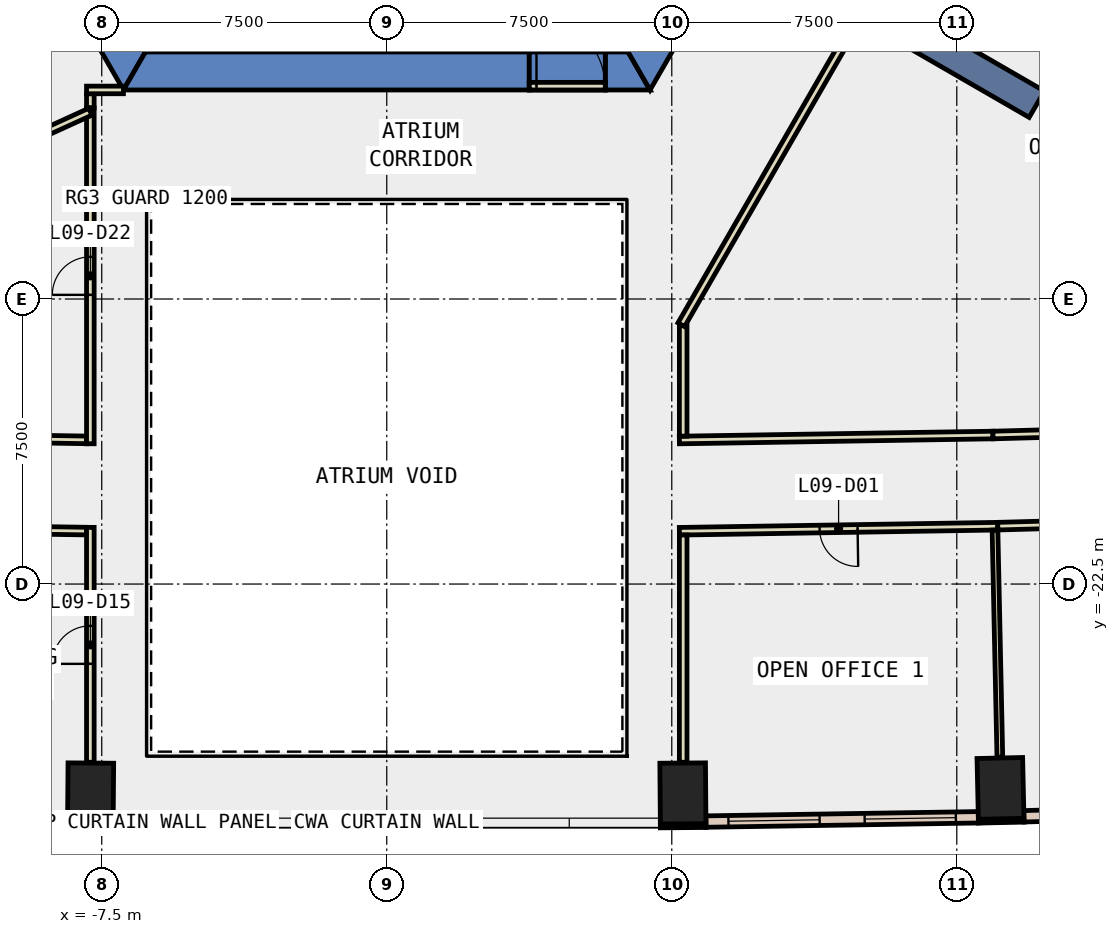
"""IFC4 building model, lengths in metres.
Left out: names, types, materials, properties, quantities, classifications, styles, units other than length and angle.
Written with IfcOpenShell. Run it as: python <this file> out.ifc"""

import sys

from ifc_helpers import new_model, si_unit, direction, frame, frame_2d, origin, origin_2d, place, context, subcontext, project, spatial, polyline, rectangle, outline, extrude, element, fill, save


model = new_model("IFC4")
c1 = context("Model", 3, precision=1e-05, world=origin(), true_north=direction((0.0, 1.0)))
c2 = subcontext(c1, "Body", "Model", "MODEL_VIEW")
j1 = project(units=[si_unit("LENGTHUNIT", "METRE"), si_unit("PLANEANGLEUNIT", "RADIAN")], contexts=[c1])
p1 = place(None, origin())
s1 = spatial("IfcSite", under=j1, at=p1, CompositionType="ELEMENT")
p2 = place(p1, origin())
s2 = spatial("IfcBuilding", under=s1, at=p2, CompositionType="ELEMENT")
p3 = place(p2, frame((0.0, 0.0, 47.6)))
s3 = spatial("IfcBuildingStorey", under=s2, at=p3, CompositionType="ELEMENT", Elevation=47.6)
for number, where, z_axis, x_axis in (
    (1, (-7.793, -28.01, -0.4), (0.0, 0.0, 1.0), (-1.0, 0.008, 0.0)),
    (2, (7.793, -28.01, -0.4), (0.0, 0.0, 1.0), (1.0, 0.008, 0.0)),
    (3, (16.15, -27.877, -0.4), (0.0, 0.0, 1.0), (1.0, 0.022, 0.0)),
):
    element("IfcColumn", number, at=place(p3, frame(where, z_axis=z_axis, x_axis=x_axis)), inside=s3, PredefinedType="COLUMN", context=c2, shape_type="SweptSolid", body=[
        extrude(rectangle(XDim=1.2, YDim=1.6, at=origin_2d()), origin(), (0.0, 0.0, 1.0), 4.2),
    ])
p4 = place(p3, frame((0.0, 0.0, -0.4)))
e4 = element("IfcWall", 4, at=p4, inside=s3, PredefinedType="SHEAR", context=c2, shape_type="SweptSolid", body=[
    extrude(outline(polyline([(-13.856, 2.5), (-6.928, -9.5), (-6.351, -8.5), (-12.702, 2.5), (-13.856, 2.5)])), origin(), (0.0, 0.0, 1.0), 4.2),
])
p5 = place(p3, frame((0.0, 0.0, -0.4)))
e5 = element("IfcWall", 5, at=p5, inside=s3, PredefinedType="SHEAR", context=c2, shape_type="SweptSolid", body=[
    extrude(outline(polyline([(3.75, -9.5), (3.75, -8.5), (-6.351, -8.5), (-6.928, -9.5), (3.75, -9.5)])), origin(), (0.0, 0.0, 1.0), 4.2),
])
p6 = place(p3, frame((0.0, 0.0, -0.4)))
e6 = element("IfcWall", 6, at=p6, inside=s3, PredefinedType="SHEAR", context=c2, shape_type="SweptSolid", body=[
    extrude(outline(polyline([(5.75, -8.5), (5.75, -9.5), (6.928, -9.5), (6.351, -8.5), (5.75, -8.5)])), origin(), (0.0, 0.0, 1.0), 4.2),
])
p7 = place(p3, frame((0.0, 0.0, 3.6)))
e7 = element("IfcWall", 7, at=p7, inside=s3, PredefinedType="SHEAR", context=c2, shape_type="SweptSolid", body=[
    extrude(outline(polyline([(5.75, -9.5), (5.75, -8.5), (3.75, -8.5), (3.75, -9.5), (5.75, -9.5)])), origin(), (0.0, 0.0, 1.0), 0.2),
])
p8 = place(p3, frame((0.0, 0.0, -0.4)))
e8 = element("IfcWall", 8, at=p8, inside=s3, PredefinedType="SHEAR", context=c2, shape_type="SweptSolid", body=[
    extrude(outline(polyline([(8.117, -7.44), (7.252, -6.94), (6.351, -8.5), (6.928, -9.5), (8.117, -7.44)])), origin(), (0.0, 0.0, 1.0), 4.2),
])
p9 = place(p3, frame((9.31, -5.375, -0.4), z_axis=(0.0, 0.0, 1.0), x_axis=(0.866017533419, -0.500013631625, 0.0)))
e9 = element("IfcWall", 9, at=p9, inside=s3, PredefinedType="SHEAR", context=c2, shape_type="SweptSolid", body=[
    extrude(rectangle(XDim=9.0, YDim=0.8, at=frame_2d((4.5, 0.0))), origin(), (0.0, 0.0, 1.0), 4.2),
])
for number, where, z_axis, x_axis in (
    (10, (-8.4, -28.855, 0.0), (0.0, 0.0, 1.0), (1.0, -0.008, 0.0)),
    (11, (7.2, -28.865, 0.0), (0.0, 0.0, 1.0), (1.0, 0.008, 0.0)),
):
    element("IfcWall", number, at=place(p3, frame(where, z_axis=z_axis, x_axis=x_axis)), inside=s3, PredefinedType="STANDARD", context=c2, shape_type="SweptSolid", body=[
        extrude(rectangle(XDim=1.2, YDim=0.1, at=frame_2d((0.6, 0.0))), origin(), (0.0, 0.0, 1.0), 3.8),
    ])
p10 = place(p3, frame((15.569, -28.74, 0.0), z_axis=(0.0, 0.0, 1.0), x_axis=(0.99976752127, 0.021561618973, 0.0)))
e12 = element("IfcWall", 12, at=p10, inside=s3, PredefinedType="STANDARD", context=c2, shape_type="SweptSolid", body=[
    extrude(rectangle(XDim=1.2, YDim=0.1, at=frame_2d((0.6, 0.0))), origin(), (0.0, 0.0, 1.0), 3.8),
])
p11 = place(p3, frame((-15.568, -28.637, 0.0), z_axis=(0.0, 0.0, 1.0), x_axis=(0.999875756772, -0.015762963512, 0.0)))
e13 = element("IfcWall", 13, at=p11, inside=s3, PredefinedType="STANDARD", context=c2, shape_type="SweptSolid", body=[
    extrude(rectangle(XDim=7.171, YDim=0.3, at=frame_2d((3.585, 0.0))), origin(), (0.0, 0.0, 1.0), 3.8),
])
p12 = place(p11, frame((0.593, 0.0, 0.9)))
e14 = element("IfcOpeningElement", 14, at=p12, cuts=e13, PredefinedType="OPENING", context=c2, shape_type="SweptSolid", body=[
    extrude(rectangle(XDim=2.4, YDim=2.6, at=frame_2d((1.2, 1.3))), frame((0.0, 0.16, 0.0), z_axis=(0.0, -1.0, 0.0), x_axis=(1.0, 0.0, 0.0)), (0.0, 0.0, 1.0), 0.32),
])
p13 = place(p11, frame((4.178, 0.0, 0.9)))
e15 = element("IfcOpeningElement", 15, at=p13, cuts=e13, PredefinedType="OPENING", context=c2, shape_type="SweptSolid", body=[
    extrude(rectangle(XDim=2.4, YDim=2.6, at=frame_2d((1.2, 1.3))), frame((0.0, 0.16, 0.0), z_axis=(0.0, -1.0, 0.0), x_axis=(1.0, 0.0, 0.0)), (0.0, 0.0, 1.0), 0.32),
])
p14 = place(p3, frame((8.398, -28.75, 0.0), z_axis=(0.0, 0.0, 1.0), x_axis=(0.999875756772, 0.015762963512, 0.0)))
e16 = element("IfcWall", 16, at=p14, inside=s3, PredefinedType="STANDARD", context=c2, shape_type="SweptSolid", body=[
    extrude(rectangle(XDim=7.171, YDim=0.3, at=frame_2d((3.585, 0.0))), origin(), (0.0, 0.0, 1.0), 3.8),
])
p15 = place(p14, frame((0.593, 0.0, 0.9)))
e17 = element("IfcOpeningElement", 17, at=p15, cuts=e16, PredefinedType="OPENING", context=c2, shape_type="SweptSolid", body=[
    extrude(rectangle(XDim=2.4, YDim=2.6, at=frame_2d((1.2, 1.3))), frame((0.0, 0.16, 0.0), z_axis=(0.0, -1.0, 0.0), x_axis=(1.0, 0.0, 0.0)), (0.0, 0.0, 1.0), 0.32),
])
p16 = place(p14, frame((4.178, 0.0, 0.9)))
e18 = element("IfcOpeningElement", 18, at=p16, cuts=e16, PredefinedType="OPENING", context=c2, shape_type="SweptSolid", body=[
    extrude(rectangle(XDim=2.4, YDim=2.6, at=frame_2d((1.2, 1.3))), frame((0.0, 0.16, 0.0), z_axis=(0.0, -1.0, 0.0), x_axis=(1.0, 0.0, 0.0)), (0.0, 0.0, 1.0), 0.32),
])
p17 = place(p3, frame((16.765, -28.611, 0.0), z_axis=(0.0, 0.0, 1.0), x_axis=(0.999633925798, 0.027055764512, 0.0)))
e19 = element("IfcWall", 19, at=p17, inside=s3, PredefinedType="STANDARD", context=c2, shape_type="SweptSolid", body=[
    extrude(rectangle(XDim=7.174, YDim=0.3, at=frame_2d((3.587, 0.0))), origin(), (0.0, 0.0, 1.0), 3.8),
])
p18 = place(p17, frame((0.593, 0.0, 0.9)))
e20 = element("IfcOpeningElement", 20, at=p18, cuts=e19, PredefinedType="OPENING", context=c2, shape_type="SweptSolid", body=[
    extrude(rectangle(XDim=2.4, YDim=2.6, at=frame_2d((1.2, 1.3))), frame((0.0, 0.16, 0.0), z_axis=(0.0, -1.0, 0.0), x_axis=(1.0, 0.0, 0.0)), (0.0, 0.0, 1.0), 0.32),
])
p19 = place(p17, frame((4.18, 0.0, 0.9)))
e21 = element("IfcOpeningElement", 21, at=p19, cuts=e19, PredefinedType="OPENING", context=c2, shape_type="SweptSolid", body=[
    extrude(rectangle(XDim=2.4, YDim=2.6, at=frame_2d((1.2, 1.3))), frame((0.0, 0.16, 0.0), z_axis=(0.0, -1.0, 0.0), x_axis=(1.0, 0.0, 0.0)), (0.0, 0.0, 1.0), 0.32),
])
p20 = place(p3, frame((7.7, -18.71, 0.0), z_axis=(0.0, 0.0, 1.0), x_axis=(0.999874256061, 0.015857870791, 0.0)))
e22 = element("IfcWall", 22, at=p20, inside=s3, PredefinedType="PARTITIONING", context=c2, shape_type="SweptSolid", body=[
    extrude(rectangle(XDim=8.252, YDim=0.2, at=frame_2d((4.126, 0.0))), origin(), (0.0, 0.0, 1.0), 3.8),
])
p21 = place(p3, frame((15.951, -18.579, 0.0), z_axis=(0.0, 0.0, 1.0), x_axis=(0.999635034593, 0.027014766613, 0.0)))
e23 = element("IfcWall", 23, at=p21, inside=s3, PredefinedType="PARTITIONING", context=c2, shape_type="SweptSolid", body=[
    extrude(rectangle(XDim=8.26, YDim=0.2, at=frame_2d((4.13, 0.0))), origin(), (0.0, 0.0, 1.0), 3.8),
])
p22 = place(p21, frame((3.23, 0.0, 0.0)))
e24 = element("IfcOpeningElement", 24, at=p22, cuts=e23, PredefinedType="OPENING", context=c2, shape_type="SweptSolid", body=[
    extrude(rectangle(XDim=1.8, YDim=2.1, at=frame_2d((0.9, 1.05))), frame((0.0, 0.11, 0.0), z_axis=(0.0, -1.0, 0.0), x_axis=(1.0, 0.0, 0.0)), (0.0, 0.0, 1.0), 0.22),
])
p23 = place(p3, frame((-11.477, -18.65, 0.0), z_axis=(0.0, 0.0, 1.0), x_axis=(0.9998724957, -0.015968479661, 0.0)))
e25 = element("IfcWall", 25, at=p23, inside=s3, PredefinedType="PARTITIONING", context=c2, shape_type="SweptSolid", body=[
    extrude(rectangle(XDim=3.578, YDim=0.2, at=frame_2d((1.789, 0.0))), origin(), (0.0, 0.0, 1.0), 3.8),
])
p24 = place(p3, frame((16.078, -20.978, 0.0), z_axis=(0.0, 0.0, 1.0), x_axis=(-0.999873907997, -0.015879801838, 0.0)))
e26 = element("IfcWall", 26, at=p24, inside=s3, PredefinedType="PARTITIONING", context=c2, shape_type="SweptSolid", body=[
    extrude(rectangle(XDim=8.379, YDim=0.2, at=frame_2d((4.189, 0.0))), origin(), (0.0, 0.0, 1.0), 3.8),
])
p25 = place(p24, frame((3.689, 0.0, 0.0)))
e27 = element("IfcOpeningElement", 27, at=p25, cuts=e26, PredefinedType="OPENING", context=c2, shape_type="SweptSolid", body=[
    extrude(rectangle(XDim=1.0, YDim=2.1, at=frame_2d((0.5, 1.05))), frame((0.0, 0.11, 0.0), z_axis=(0.0, -1.0, 0.0), x_axis=(1.0, 0.0, 0.0)), (0.0, 0.0, 1.0), 0.22),
])
p26 = place(p3, frame((24.286, -20.755, 0.0), z_axis=(0.0, 0.0, 1.0), x_axis=(-0.999633883909, -0.027057312146, 0.0)))
e28 = element("IfcWall", 28, at=p26, inside=s3, PredefinedType="PARTITIONING", context=c2, shape_type="SweptSolid", body=[
    extrude(rectangle(XDim=8.211, YDim=0.2, at=frame_2d((4.105, 0.0))), origin(), (0.0, 0.0, 1.0), 3.8),
])
p27 = place(p26, frame((3.681, 0.0, 0.0)))
e29 = element("IfcOpeningElement", 29, at=p27, cuts=e28, PredefinedType="OPENING", context=c2, shape_type="SweptSolid", body=[
    extrude(rectangle(XDim=1.0, YDim=2.1, at=frame_2d((0.5, 1.05))), frame((0.0, 0.11, 0.0), z_axis=(0.0, -1.0, 0.0), x_axis=(1.0, 0.0, 0.0)), (0.0, 0.0, 1.0), 0.22),
])
p28 = place(p3, frame((-7.9, -21.107, 0.0), z_axis=(0.0, 0.0, 1.0), x_axis=(-0.999876676102, 0.015704540367, 0.0)))
e30 = element("IfcWall", 30, at=p28, inside=s3, PredefinedType="PARTITIONING", context=c2, shape_type="SweptSolid", body=[
    extrude(rectangle(XDim=3.886, YDim=0.2, at=frame_2d((1.943, 0.0))), origin(), (0.0, 0.0, 1.0), 3.8),
])
p29 = place(p3, frame((7.8, -15.69, 0.0), z_axis=(0.0, 0.0, 1.0), x_axis=(0.0, -1.0, 0.0)))
e31 = element("IfcWall", 31, at=p29, inside=s3, PredefinedType="PARTITIONING", context=c2, shape_type="SweptSolid", body=[
    extrude(rectangle(XDim=2.919, YDim=0.2, at=frame_2d((1.459, 0.0))), origin(), (0.0, 0.0, 1.0), 3.8),
])
p30 = place(p3, frame((-7.8, -9.972, 0.0), z_axis=(0.0, 0.0, 1.0), x_axis=(0.0, 1.0, 0.0)))
e32 = element("IfcWall", 32, at=p30, inside=s3, PredefinedType="PARTITIONING", context=c2, shape_type="SweptSolid", body=[
    extrude(rectangle(XDim=0.373, YDim=0.2, at=frame_2d((0.187, 0.0))), origin(), (0.0, 0.0, 1.0), 3.8),
])
p31 = place(p3, frame((-7.9, -9.499, 0.0), z_axis=(0.0, 0.0, 1.0), x_axis=(1.0, 0.0, 0.0)))
e33 = element("IfcWall", 33, at=p31, inside=s3, PredefinedType="PARTITIONING", context=c2, shape_type="SweptSolid", body=[
    extrude(rectangle(XDim=0.971, YDim=0.2, at=frame_2d((0.485, 0.0))), origin(), (0.0, 0.0, 1.0), 3.8),
])
p32 = place(p3, frame((-7.8, -18.809, 0.0), z_axis=(0.0, 0.0, 1.0), x_axis=(0.0, 1.0, 0.0)))
e34 = element("IfcWall", 34, at=p32, inside=s3, PredefinedType="PARTITIONING", context=c2, shape_type="SweptSolid", body=[
    extrude(rectangle(XDim=8.837, YDim=0.2, at=frame_2d((4.418, 0.0))), origin(), (0.0, 0.0, 1.0), 3.8),
])
p33 = place(p32, frame((3.918, 0.0, 0.0)))
e35 = element("IfcOpeningElement", 35, at=p33, cuts=e34, PredefinedType="OPENING", context=c2, shape_type="SweptSolid", body=[
    extrude(rectangle(XDim=1.0, YDim=2.1, at=frame_2d((0.5, 1.05))), frame((0.0, 0.11, 0.0), z_axis=(0.0, -1.0, 0.0), x_axis=(1.0, 0.0, 0.0)), (0.0, 0.0, 1.0), 0.22),
])
p34 = place(p3, frame((7.8, -21.209, 0.0), z_axis=(0.0, 0.0, 1.0), x_axis=(0.0, -1.0, 0.0)))
e36 = element("IfcWall", 36, at=p34, inside=s3, PredefinedType="PARTITIONING", context=c2, shape_type="SweptSolid", body=[
    extrude(rectangle(XDim=5.981, YDim=0.2, at=frame_2d((2.99, 0.0))), origin(), (0.0, 0.0, 1.0), 3.8),
])
p35 = place(p3, frame((-7.8, -27.19, 0.0), z_axis=(0.0, 0.0, 1.0), x_axis=(0.0, 1.0, 0.0)))
e37 = element("IfcWall", 37, at=p35, inside=s3, PredefinedType="PARTITIONING", context=c2, shape_type="SweptSolid", body=[
    extrude(rectangle(XDim=6.181, YDim=0.2, at=frame_2d((3.09, 0.0))), origin(), (0.0, 0.0, 1.0), 3.8),
])
p36 = place(p35, frame((2.59, 0.0, 0.0)))
e38 = element("IfcOpeningElement", 38, at=p36, cuts=e37, PredefinedType="OPENING", context=c2, shape_type="SweptSolid", body=[
    extrude(rectangle(XDim=1.0, YDim=2.1, at=frame_2d((0.5, 1.05))), frame((0.0, 0.11, 0.0), z_axis=(0.0, -1.0, 0.0), x_axis=(1.0, 0.0, 0.0)), (0.0, 0.0, 1.0), 0.22),
])
p37 = place(p3, frame((-7.8, -10.072, 0.0), z_axis=(0.0, 0.0, 1.0), x_axis=(-0.910011899741, -0.414582129777, 0.0)))
e39 = element("IfcWall", 39, at=p37, inside=s3, PredefinedType="PARTITIONING", context=c2, shape_type="SweptSolid", body=[
    extrude(rectangle(XDim=7.694, YDim=0.2, at=frame_2d((3.847, 0.0))), origin(), (0.0, 0.0, 1.0), 3.8),
])
p38 = place(p3, frame((16.005, -21.079, 0.0), z_axis=(0.0, 0.0, 1.0), x_axis=(0.021436771826, -0.999770206004, 0.0)))
e40 = element("IfcWall", 40, at=p38, inside=s3, PredefinedType="PARTITIONING", context=c2, shape_type="SweptSolid", body=[
    extrude(rectangle(XDim=5.979, YDim=0.15, at=frame_2d((2.99, 0.0))), origin(), (0.0, 0.0, 1.0), 3.8),
])
p39 = place(p3, frame((3.75, -9.4, 0.0), z_axis=(0.0, 0.0, 1.0), x_axis=(1.0, 0.0, 0.0)))
e41 = element("IfcWall", 41, at=p39, inside=s3, PredefinedType="PARTITIONING", context=c2, shape_type="SweptSolid", body=[
    extrude(rectangle(XDim=2.0, YDim=0.2, at=frame_2d((1.0, 0.0))), origin(), (0.0, 0.0, 1.0), 2.4),
])
p40 = place(p39, frame((0.19, 0.0, 0.0)))
e42 = element("IfcOpeningElement", 42, at=p40, cuts=e41, PredefinedType="OPENING", context=c2, shape_type="SweptSolid", body=[
    extrude(rectangle(XDim=1.8, YDim=2.1, at=frame_2d((0.9, 1.05))), frame((0.0, 0.11, 0.0), z_axis=(0.0, -1.0, 0.0), x_axis=(1.0, 0.0, 0.0)), (0.0, 0.0, 1.0), 0.22),
])
p41 = place(p3, frame((12.401, -7.621, 0.0), z_axis=(0.0, 0.0, 1.0), x_axis=(-0.499983724212, -0.866034800411, 0.0)))
e43 = element("IfcWall", 43, at=p41, inside=s3, PredefinedType="PARTITIONING", context=c2, shape_type="SweptSolid", body=[
    extrude(rectangle(XDim=9.302, YDim=0.2, at=frame_2d((4.651, 0.0))), origin(), (0.0, 0.0, 1.0), 3.8),
])
p42 = place(p15, origin())
e44 = element("IfcWindow", 44, at=p42, inside=s3, PartitioningType="SINGLE_PANEL", PredefinedType="WINDOW", context=c2, shape_type="SweptSolid", body=[
    extrude(rectangle(XDim=2.4, YDim=2.6, at=frame_2d((1.2, 1.3))), frame((0.0, 0.03, 0.0), z_axis=(0.0, -1.0, 0.0), x_axis=(1.0, 0.0, 0.0)), (0.0, 0.0, 1.0), 0.06),
])
fill(e17, e44)
p43 = place(p16, origin())
e45 = element("IfcWindow", 45, at=p43, inside=s3, PartitioningType="SINGLE_PANEL", PredefinedType="WINDOW", context=c2, shape_type="SweptSolid", body=[
    extrude(rectangle(XDim=2.4, YDim=2.6, at=frame_2d((1.2, 1.3))), frame((0.0, 0.03, 0.0), z_axis=(0.0, -1.0, 0.0), x_axis=(1.0, 0.0, 0.0)), (0.0, 0.0, 1.0), 0.06),
])
fill(e18, e45)
p44 = place(p25, origin())
e46 = element("IfcDoor", 46, at=p44, inside=s3, OperationType="SINGLE_SWING_RIGHT", PredefinedType="DOOR", context=c2, shape_type="SweptSolid", body=[
    extrude(rectangle(XDim=1.0, YDim=2.1, at=frame_2d((0.5, 1.05))), frame((0.0, 0.025, 0.0), z_axis=(0.0, -1.0, 0.0), x_axis=(1.0, 0.0, 0.0)), (0.0, 0.0, 1.0), 0.05),
])
fill(e27, e46)
p45 = place(p36, origin())
e47 = element("IfcDoor", 47, at=p45, inside=s3, OperationType="SINGLE_SWING_LEFT", PredefinedType="DOOR", context=c2, shape_type="SweptSolid", body=[
    extrude(rectangle(XDim=1.0, YDim=2.1, at=frame_2d((0.5, 1.05))), frame((0.0, 0.025, 0.0), z_axis=(0.0, -1.0, 0.0), x_axis=(1.0, 0.0, 0.0)), (0.0, 0.0, 1.0), 0.05),
])
fill(e38, e47)
p46 = place(p33, origin())
e48 = element("IfcDoor", 48, at=p46, inside=s3, OperationType="SINGLE_SWING_RIGHT", PredefinedType="DOOR", context=c2, shape_type="SweptSolid", body=[
    extrude(rectangle(XDim=1.0, YDim=2.1, at=frame_2d((0.5, 1.05))), frame((0.0, 0.025, 0.0), z_axis=(0.0, -1.0, 0.0), x_axis=(1.0, 0.0, 0.0)), (0.0, 0.0, 1.0), 0.05),
])
fill(e35, e48)
p47 = place(p40, origin())
e49 = element("IfcDoor", 49, at=p47, inside=s3, OperationType="DOUBLE_DOOR_SINGLE_SWING", PredefinedType="DOOR", context=c2, shape_type="SweptSolid", body=[
    extrude(rectangle(XDim=1.8, YDim=2.1, at=frame_2d((0.9, 1.05))), frame((0.0, 0.025, 0.0), z_axis=(0.0, -1.0, 0.0), x_axis=(1.0, 0.0, 0.0)), (0.0, 0.0, 1.0), 0.05),
])
fill(e42, e49)
save(model, sys.argv[1])
